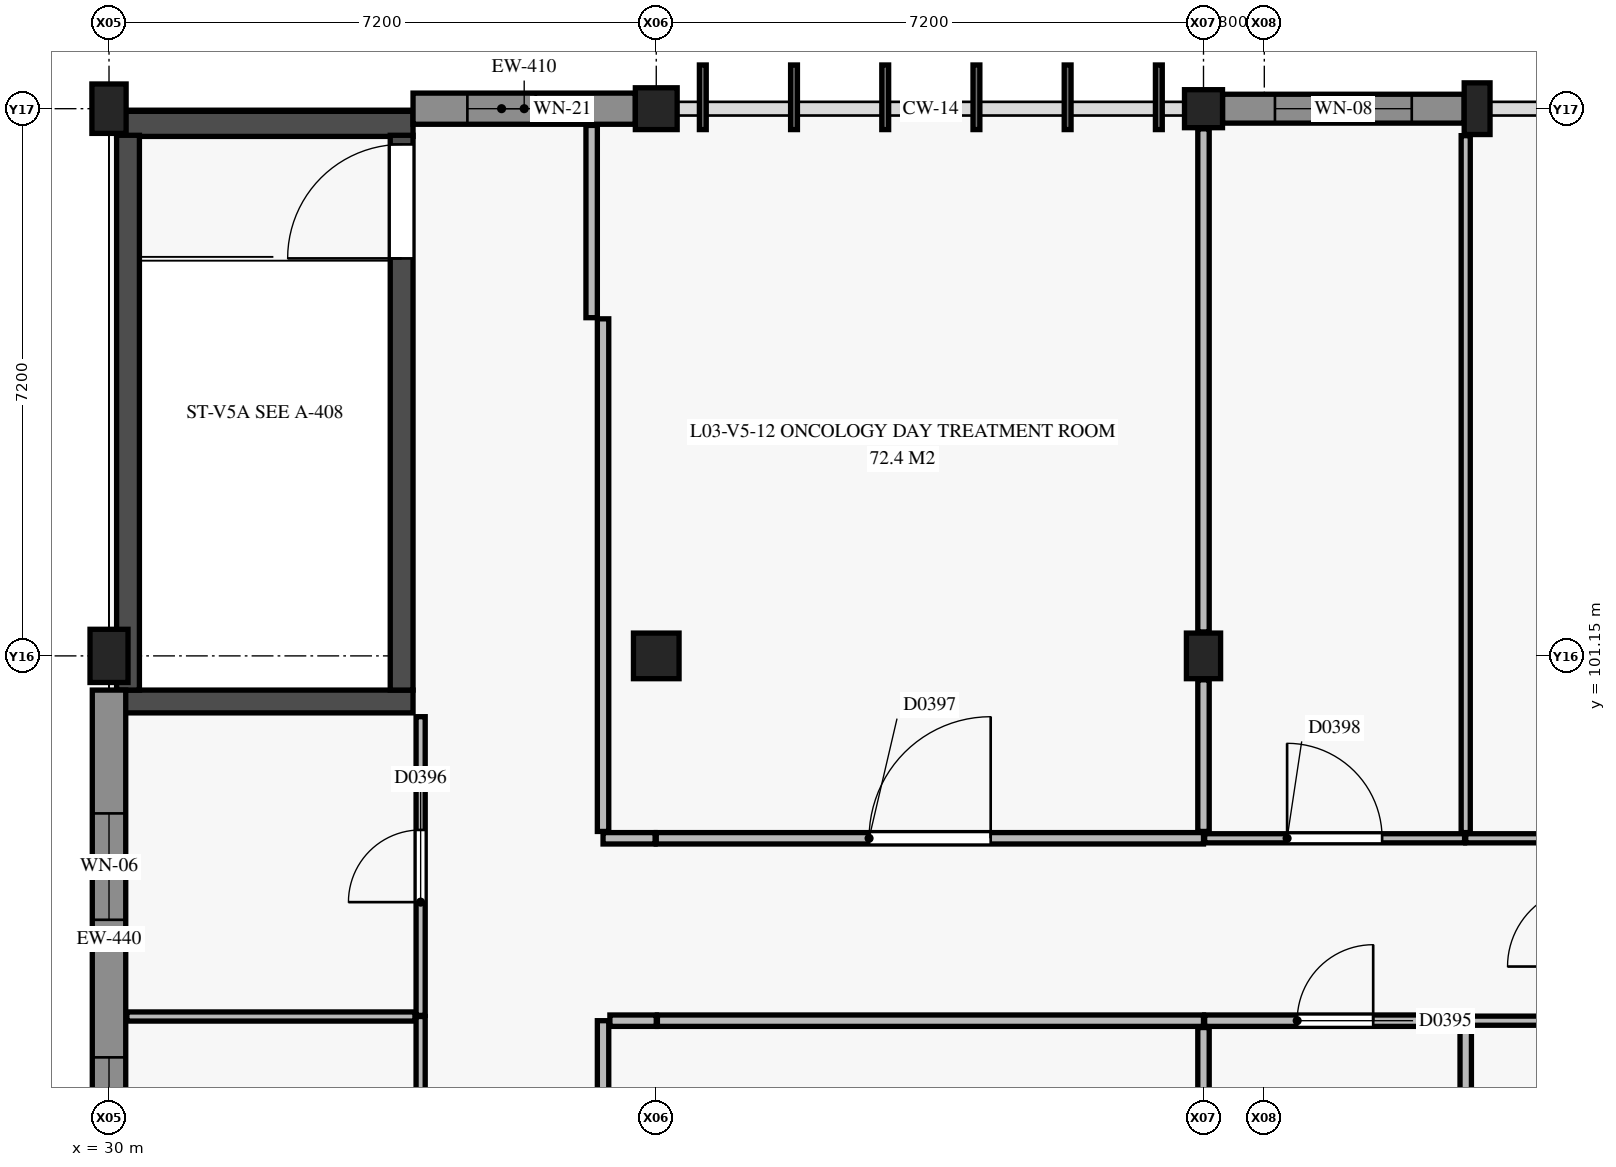
"""IFC4 building model, lengths in metres.
Left out: names, types, materials, properties, quantities, classifications, styles, units other than length and angle.
Written with IfcOpenShell. Run it as: python <this file> out.ifc"""

import sys

from ifc_helpers import new_model, si_unit, direction, frame, frame_2d, origin, origin_2d, place, context, subcontext, project, spatial, rectangle, circle, extrude, element, fill, save


model = new_model("IFC4")
c1 = context("Model", 3, precision=1e-05, world=origin(), true_north=direction((0.0, 1.0)))
c2 = subcontext(c1, "Body", "Model", "MODEL_VIEW")
j1 = project(units=[si_unit("LENGTHUNIT", "METRE"), si_unit("PLANEANGLEUNIT", "RADIAN")], contexts=[c1])
p1 = place(None, origin())
s1 = spatial("IfcSite", under=j1, at=p1, CompositionType="ELEMENT")
p2 = place(p1, origin())
s2 = spatial("IfcBuilding", under=s1, at=p2, CompositionType="ELEMENT")
p3 = place(p2, frame((0.0, 0.0, 13.2)))
s3 = spatial("IfcBuildingStorey", under=s2, at=p3, CompositionType="ELEMENT", Elevation=13.2)
p4 = place(p3, frame((30.0, 101.15, 0.0), z_axis=(0.0, 0.0, 1.0), x_axis=(1.0, 0.0, 0.0)))
e1 = element("IfcColumn", 1, at=p4, inside=s3, PredefinedType="COLUMN", context=c2, shape_type="SweptSolid", body=[
    extrude(rectangle(XDim=0.5, YDim=0.7, at=origin_2d()), origin(), (0.0, 0.0, 1.0), 4.05),
])
p5 = place(p3, frame((30.0, 108.35, 0.0), z_axis=(0.0, 0.0, 1.0), x_axis=(1.0, 0.0, 0.0)))
e2 = element("IfcColumn", 2, at=p5, inside=s3, PredefinedType="COLUMN", context=c2, shape_type="SweptSolid", body=[
    extrude(rectangle(XDim=0.45, YDim=0.65, at=origin_2d()), origin(), (0.0, 0.0, 1.0), 4.36),
])
p6 = place(p3, frame((37.2, 101.15, 0.0), z_axis=(0.0, 0.0, 1.0), x_axis=(1.0, 0.0, 0.0)))
e3 = element("IfcColumn", 3, at=p6, inside=s3, PredefinedType="COLUMN", context=c2, shape_type="SweptSolid", body=[
    extrude(rectangle(XDim=0.6, YDim=0.6, at=origin_2d()), origin(), (0.0, 0.0, 1.0), 4.05),
])
p7 = place(p3, frame((37.2, 108.35, 0.0), z_axis=(0.0, 0.0, 1.0), x_axis=(1.0, 0.0, 0.0)))
e4 = element("IfcColumn", 4, at=p7, inside=s3, PredefinedType="COLUMN", context=c2, shape_type="SweptSolid", body=[
    extrude(rectangle(XDim=0.55, YDim=0.55, at=origin_2d()), origin(), (0.0, 0.0, 1.0), 4.36),
])
p8 = place(p3, frame((44.4, 101.15, 0.0), z_axis=(0.0, 0.0, 1.0), x_axis=(1.0, 0.0, 0.0)))
e5 = element("IfcColumn", 5, at=p8, inside=s3, PredefinedType="COLUMN", context=c2, shape_type="SweptSolid", body=[
    extrude(rectangle(XDim=0.45, YDim=0.6, at=origin_2d()), origin(), (0.0, 0.0, 1.0), 4.05),
])
p9 = place(p3, frame((44.4, 108.35, 0.0), z_axis=(0.0, 0.0, 1.0), x_axis=(1.0, 0.0, 0.0)))
e6 = element("IfcColumn", 6, at=p9, inside=s3, PredefinedType="COLUMN", context=c2, shape_type="SweptSolid", body=[
    extrude(circle(Radius=0.25, at=origin_2d()), origin(), (0.0, 0.0, 1.0), 4.36),
])
p10 = place(p3, frame((48.0, 108.35, 0.0), z_axis=(0.0, 0.0, 1.0), x_axis=(1.0, 0.0, 0.0)))
e7 = element("IfcColumn", 7, at=p10, inside=s3, PredefinedType="PILASTER", context=c2, shape_type="SweptSolid", body=[
    extrude(rectangle(XDim=0.34, YDim=0.68, at=origin_2d()), origin(), (0.0, 0.0, 1.0), 4.2),
])
p11 = place(p3, frame((30.1, 100.55, 0.0), z_axis=(0.0, 0.0, 1.0), x_axis=(1.0, 0.0, 0.0)))
e8 = element("IfcWall", 8, at=p11, inside=s3, PredefinedType="SHEAR", context=c2, shape_type="SweptSolid", body=[
    extrude(rectangle(XDim=3.9, YDim=0.3, at=frame_2d((1.95, 0.0))), origin(), (0.0, 0.0, 1.0), 4.2),
])
p12 = place(p3, frame((30.1, 108.15, 0.0), z_axis=(0.0, 0.0, 1.0), x_axis=(1.0, 0.0, 0.0)))
e9 = element("IfcWall", 9, at=p12, inside=s3, PredefinedType="SHEAR", context=c2, shape_type="SweptSolid", body=[
    extrude(rectangle(XDim=3.9, YDim=0.33, at=frame_2d((1.95, 0.0))), origin(), (0.0, 0.0, 1.0), 4.2),
])
p13 = place(p3, frame((30.25, 100.7, 0.0), z_axis=(0.0, 0.0, 1.0), x_axis=(0.0, 1.0, 0.0)))
e10 = element("IfcWall", 10, at=p13, inside=s3, PredefinedType="SHEAR", context=c2, shape_type="SweptSolid", body=[
    extrude(rectangle(XDim=7.3, YDim=0.3, at=frame_2d((3.65, 0.0))), origin(), (0.0, 0.0, 1.0), 4.2),
])
p14 = place(p3, frame((33.85, 100.7, 0.0), z_axis=(0.0, 0.0, 1.0), x_axis=(0.0, 1.0, 0.0)))
e11 = element("IfcWall", 11, at=p14, inside=s3, PredefinedType="SHEAR", context=c2, shape_type="SweptSolid", body=[
    extrude(rectangle(XDim=7.3, YDim=0.3, at=frame_2d((3.65, 0.0))), origin(), (0.0, 0.0, 1.0), 4.2),
])
p15 = place(p14, frame((5.68, 0.0, 0.0)))
e12 = element("IfcOpeningElement", 12, at=p15, cuts=e11, PredefinedType="OPENING", context=c2, shape_type="SweptSolid", body=[
    extrude(rectangle(XDim=1.5, YDim=2.15, at=frame_2d((0.75, 1.075))), frame((0.0, 0.16, 0.0), z_axis=(0.0, -1.0, 0.0), x_axis=(1.0, 0.0, 0.0)), (0.0, 0.0, 1.0), 0.32),
])
p16 = place(p3, frame((30.0, 94.15, 0.0), z_axis=(0.0, 0.0, 1.0), x_axis=(0.0, 1.0, 0.0)))
e13 = element("IfcWall", 13, at=p16, inside=s3, PredefinedType="USERDEFINED", context=c2, shape_type="SweptSolid", body=[
    extrude(rectangle(XDim=6.55, YDim=0.44, at=frame_2d((3.275, 0.0))), origin(), (0.0, 0.0, 1.0), 3.38),
])
p17 = place(p16, frame((0.518, 0.0, 0.9)))
e14 = element("IfcOpeningElement", 14, at=p17, cuts=e13, PredefinedType="OPENING", context=c2, shape_type="SweptSolid", body=[
    extrude(rectangle(XDim=1.2, YDim=1.8, at=frame_2d((0.6, 0.9))), frame((0.0, 0.23, 0.0), z_axis=(0.0, -1.0, 0.0), x_axis=(1.0, 0.0, 0.0)), (0.0, 0.0, 1.0), 0.46),
])
p18 = place(p16, frame((3.528, 0.0, 0.9)))
e15 = element("IfcOpeningElement", 15, at=p18, cuts=e13, PredefinedType="OPENING", context=c2, shape_type="SweptSolid", body=[
    extrude(rectangle(XDim=1.4, YDim=1.8, at=frame_2d((0.7, 0.9))), frame((0.0, 0.23, 0.0), z_axis=(0.0, -1.0, 0.0), x_axis=(1.0, 0.0, 0.0)), (0.0, 0.0, 1.0), 0.46),
])
p19 = place(p3, frame((34.0, 108.35, 0.0), z_axis=(0.0, 0.0, 1.0), x_axis=(1.0, 0.0, 0.0)))
e16 = element("IfcWall", 16, at=p19, inside=s3, PredefinedType="USERDEFINED", context=c2, shape_type="SweptSolid", body=[
    extrude(rectangle(XDim=2.925, YDim=0.41, at=frame_2d((1.462, 0.0))), origin(), (0.0, 0.0, 1.0), 3.38),
])
p20 = place(p19, frame((0.715, 0.0, 0.95)))
e17 = element("IfcOpeningElement", 17, at=p20, cuts=e16, PredefinedType="OPENING", context=c2, shape_type="SweptSolid", body=[
    extrude(rectangle(XDim=0.9, YDim=1.2, at=frame_2d((0.45, 0.6))), frame((0.0, 0.215, 0.0), z_axis=(0.0, -1.0, 0.0), x_axis=(1.0, 0.0, 0.0)), (0.0, 0.0, 1.0), 0.43),
])
p21 = place(p3, frame((44.65, 108.35, 0.0), z_axis=(0.0, 0.0, 1.0), x_axis=(1.0, 0.0, 0.0)))
e18 = element("IfcWall", 18, at=p21, inside=s3, PredefinedType="USERDEFINED", context=c2, shape_type="SweptSolid", body=[
    extrude(rectangle(XDim=3.18, YDim=0.38, at=frame_2d((1.59, 0.0))), origin(), (0.0, 0.0, 1.0), 3.38),
])
p22 = place(p21, frame((0.69, 0.0, 0.9)))
e19 = element("IfcOpeningElement", 19, at=p22, cuts=e18, PredefinedType="OPENING", context=c2, shape_type="SweptSolid", body=[
    extrude(rectangle(XDim=1.8, YDim=1.8, at=frame_2d((0.9, 0.9))), frame((0.0, 0.2, 0.0), z_axis=(0.0, -1.0, 0.0), x_axis=(1.0, 0.0, 0.0)), (0.0, 0.0, 1.0), 0.4),
])
p23 = place(p3, frame((36.5, 83.89, 0.0), z_axis=(0.0, 0.0, 1.0), x_axis=(0.0, 1.0, 0.0)))
e20 = element("IfcWall", 20, at=p23, inside=s3, PredefinedType="PARTITIONING", context=c2, shape_type="SweptSolid", body=[
    extrude(rectangle(XDim=12.46, YDim=0.15, at=frame_2d((6.23, 0.0))), origin(), (0.0, 0.0, 1.0), 3.22),
])
p24 = place(p23, frame((5.655, 0.0, 0.0)))
e21 = element("IfcOpeningElement", 21, at=p24, cuts=e20, PredefinedType="OPENING", context=c2, shape_type="SweptSolid", body=[
    extrude(rectangle(XDim=1.15, YDim=2.15, at=frame_2d((0.575, 1.075))), frame((0.0, 0.085, 0.0), z_axis=(0.0, -1.0, 0.0), x_axis=(1.0, 0.0, 0.0)), (0.0, 0.0, 1.0), 0.17),
])
p25 = place(p3, frame((36.59, 96.35, 0.0), z_axis=(0.0, 0.0, 1.0), x_axis=(1.0, 0.0, 0.0)))
e22 = element("IfcWall", 22, at=p25, inside=s3, PredefinedType="PARTITIONING", context=c2, shape_type="SweptSolid", body=[
    extrude(rectangle(XDim=0.61, YDim=0.15, at=frame_2d((0.305, 0.0))), origin(), (0.0, 0.0, 1.0), 3.95),
])
p26 = place(p3, frame((37.215, 96.35, 0.0), z_axis=(0.0, 0.0, 1.0), x_axis=(1.0, 0.0, 0.0)))
e23 = element("IfcWall", 23, at=p26, inside=s3, PredefinedType="PARTITIONING", context=c2, shape_type="SweptSolid", body=[
    extrude(rectangle(XDim=7.185, YDim=0.15, at=frame_2d((3.592, 0.0))), origin(), (0.0, 0.0, 1.0), 3.95),
])
p27 = place(p3, frame((44.415, 96.35, 0.0), z_axis=(0.0, 0.0, 1.0), x_axis=(1.0, 0.0, 0.0)))
e24 = element("IfcWall", 24, at=p27, inside=s3, PredefinedType="PARTITIONING", context=c2, shape_type="SweptSolid", body=[
    extrude(rectangle(XDim=3.435, YDim=0.15, at=frame_2d((1.718, 0.0))), origin(), (0.0, 0.0, 1.0), 3.95),
])
p28 = place(p27, frame((1.218, 0.0, 0.0)))
e25 = element("IfcOpeningElement", 25, at=p28, cuts=e24, PredefinedType="OPENING", context=c2, shape_type="SweptSolid", body=[
    extrude(rectangle(XDim=1.0, YDim=2.15, at=frame_2d((0.5, 1.075))), frame((0.0, 0.085, 0.0), z_axis=(0.0, -1.0, 0.0), x_axis=(1.0, 0.0, 0.0)), (0.0, 0.0, 1.0), 0.17),
])
p29 = place(p3, frame((36.35, 105.6, 0.0), z_axis=(0.0, 0.0, 1.0), x_axis=(0.0, 1.0, 0.0)))
e26 = element("IfcWall", 26, at=p29, inside=s3, PredefinedType="PARTITIONING", context=c2, shape_type="SweptSolid", body=[
    extrude(rectangle(XDim=2.53, YDim=0.15, at=frame_2d((1.265, 0.0))), origin(), (0.0, 0.0, 1.0), 3.95),
])
p30 = place(p3, frame((37.2, 98.75, 0.0), z_axis=(0.0, 0.0, 1.0), x_axis=(1.0, 0.0, 0.0)))
e27 = element("IfcWall", 27, at=p30, inside=s3, PredefinedType="PARTITIONING", context=c2, shape_type="SweptSolid", body=[
    extrude(rectangle(XDim=7.2, YDim=0.15, at=frame_2d((3.6, 0.0))), origin(), (0.0, 0.0, 1.0), 3.95),
])
p31 = place(p30, frame((2.8, 0.0, 0.0)))
e28 = element("IfcOpeningElement", 28, at=p31, cuts=e27, PredefinedType="OPENING", context=c2, shape_type="SweptSolid", body=[
    extrude(rectangle(XDim=1.6, YDim=2.25, at=frame_2d((0.8, 1.125))), frame((0.0, 0.085, 0.0), z_axis=(0.0, -1.0, 0.0), x_axis=(1.0, 0.0, 0.0)), (0.0, 0.0, 1.0), 0.17),
])
p32 = place(p3, frame((36.5, 98.75, 0.0), z_axis=(0.0, 0.0, 1.0), x_axis=(1.0, 0.0, 0.0)))
e29 = element("IfcWall", 29, at=p32, inside=s3, PredefinedType="PARTITIONING", context=c2, shape_type="SweptSolid", body=[
    extrude(rectangle(XDim=0.685, YDim=0.15, at=frame_2d((0.343, 0.0))), origin(), (0.0, 0.0, 1.0), 3.95),
])
p33 = place(p3, frame((36.5, 98.84, 0.0), z_axis=(0.0, 0.0, 1.0), x_axis=(0.0, 1.0, 0.0)))
e30 = element("IfcWall", 30, at=p33, inside=s3, PredefinedType="PARTITIONING", context=c2, shape_type="SweptSolid", body=[
    extrude(rectangle(XDim=6.745, YDim=0.15, at=frame_2d((3.373, 0.0))), origin(), (0.0, 0.0, 1.0), 3.95),
])
p34 = place(p3, frame((34.1, 83.8, 0.0), z_axis=(0.0, 0.0, 1.0), x_axis=(0.0, 1.0, 0.0)))
e31 = element("IfcWall", 31, at=p34, inside=s3, PredefinedType="PARTITIONING", context=c2, shape_type="SweptSolid", body=[
    extrude(rectangle(XDim=12.605, YDim=0.12, at=frame_2d((6.302, 0.0))), origin(), (0.0, 0.0, 1.0), 3.22),
])
p35 = place(p34, frame((5.677, 0.0, 0.0)))
e32 = element("IfcOpeningElement", 32, at=p35, cuts=e31, PredefinedType="OPENING", context=c2, shape_type="SweptSolid", body=[
    extrude(rectangle(XDim=1.25, YDim=2.15, at=frame_2d((0.625, 1.075))), frame((0.0, 0.07, 0.0), z_axis=(0.0, -1.0, 0.0), x_axis=(1.0, 0.0, 0.0)), (0.0, 0.0, 1.0), 0.14),
])
p36 = place(p3, frame((47.865, 96.35, 0.0), z_axis=(0.0, 0.0, 1.0), x_axis=(1.0, 0.0, 0.0)))
e33 = element("IfcWall", 33, at=p36, inside=s3, PredefinedType="PARTITIONING", context=c2, shape_type="SweptSolid", body=[
    extrude(rectangle(XDim=1.585, YDim=0.12, at=frame_2d((0.792, 0.0))), origin(), (0.0, 0.0, 1.0), 3.95),
])
p37 = place(p3, frame((47.85, 98.75, 0.0), z_axis=(0.0, 0.0, 1.0), x_axis=(1.0, 0.0, 0.0)))
e34 = element("IfcWall", 34, at=p37, inside=s3, PredefinedType="PARTITIONING", context=c2, shape_type="SweptSolid", body=[
    extrude(rectangle(XDim=1.525, YDim=0.12, at=frame_2d((0.762, 0.0))), origin(), (0.0, 0.0, 1.0), 3.95),
])
p38 = place(p3, frame((34.1, 96.42, 0.0), z_axis=(0.0, 0.0, 1.0), x_axis=(0.0, 1.0, 0.0)))
e35 = element("IfcWall", 35, at=p38, inside=s3, PredefinedType="PARTITIONING", context=c2, shape_type="SweptSolid", body=[
    extrude(rectangle(XDim=3.93, YDim=0.12, at=frame_2d((1.965, 0.0))), origin(), (0.0, 0.0, 1.0), 3.95),
])
p39 = place(p38, frame((1.49, 0.0, 0.0)))
e36 = element("IfcOpeningElement", 36, at=p39, cuts=e35, PredefinedType="OPENING", context=c2, shape_type="SweptSolid", body=[
    extrude(rectangle(XDim=0.95, YDim=2.1, at=frame_2d((0.475, 1.05))), frame((0.0, 0.07, 0.0), z_axis=(0.0, -1.0, 0.0), x_axis=(1.0, 0.0, 0.0)), (0.0, 0.0, 1.0), 0.14),
])
p40 = place(p3, frame((44.415, 98.75, 0.0), z_axis=(0.0, 0.0, 1.0), x_axis=(1.0, 0.0, 0.0)))
e37 = element("IfcWall", 37, at=p40, inside=s3, PredefinedType="PARTITIONING", context=c2, shape_type="SweptSolid", body=[
    extrude(rectangle(XDim=3.42, YDim=0.12, at=frame_2d((1.71, 0.0))), origin(), (0.0, 0.0, 1.0), 3.95),
])
p41 = place(p40, frame((1.085, 0.0, 0.0)))
e38 = element("IfcOpeningElement", 38, at=p41, cuts=e37, PredefinedType="OPENING", context=c2, shape_type="SweptSolid", body=[
    extrude(rectangle(XDim=1.25, YDim=2.15, at=frame_2d((0.625, 1.075))), frame((0.0, 0.07, 0.0), z_axis=(0.0, -1.0, 0.0), x_axis=(1.0, 0.0, 0.0)), (0.0, 0.0, 1.0), 0.14),
])
p42 = place(p3, frame((44.4, 94.29, 0.0), z_axis=(0.0, 0.0, 1.0), x_axis=(0.0, 1.0, 0.0)))
e39 = element("IfcWall", 39, at=p42, inside=s3, PredefinedType="PARTITIONING", context=c2, shape_type="SweptSolid", body=[
    extrude(rectangle(XDim=1.97, YDim=0.15, at=frame_2d((0.985, 0.0))), origin(), (0.0, 0.0, 1.0), 3.95),
])
p43 = place(p3, frame((47.85, 90.865, 0.0), z_axis=(0.0, 0.0, 1.0), x_axis=(0.0, 1.0, 0.0)))
e40 = element("IfcWall", 40, at=p43, inside=s3, PredefinedType="PARTITIONING", context=c2, shape_type="SweptSolid", body=[
    extrude(rectangle(XDim=5.395, YDim=0.15, at=frame_2d((2.698, 0.0))), origin(), (0.0, 0.0, 1.0), 3.44),
])
p44 = place(p3, frame((44.4, 98.84, 0.0), z_axis=(0.0, 0.0, 1.0), x_axis=(0.0, 1.0, 0.0)))
e41 = element("IfcWall", 41, at=p44, inside=s3, PredefinedType="PARTITIONING", context=c2, shape_type="SweptSolid", body=[
    extrude(rectangle(XDim=1.995, YDim=0.15, at=frame_2d((0.998, 0.0))), origin(), (0.0, 0.0, 1.0), 3.95),
])
p45 = place(p3, frame((44.4, 101.465, 0.0), z_axis=(0.0, 0.0, 1.0), x_axis=(0.0, 1.0, 0.0)))
e42 = element("IfcWall", 42, at=p45, inside=s3, PredefinedType="PARTITIONING", context=c2, shape_type="SweptSolid", body=[
    extrude(rectangle(XDim=6.62, YDim=0.15, at=frame_2d((3.31, 0.0))), origin(), (0.0, 0.0, 1.0), 3.95),
])
p46 = place(p3, frame((30.235, 96.405, 0.0), z_axis=(0.0, 0.0, 1.0), x_axis=(1.0, 0.0, 0.0)))
e43 = element("IfcWall", 43, at=p46, inside=s3, PredefinedType="PARTITIONING", context=c2, shape_type="SweptSolid", body=[
    extrude(rectangle(XDim=3.79, YDim=0.12, at=frame_2d((1.895, 0.0))), origin(), (0.0, 0.0, 1.0), 3.95),
])
p47 = place(p3, frame((47.85, 98.825, 0.0), z_axis=(0.0, 0.0, 1.0), x_axis=(0.0, 1.0, 0.0)))
e44 = element("IfcWall", 44, at=p47, inside=s3, PredefinedType="PARTITIONING", context=c2, shape_type="SweptSolid", body=[
    extrude(rectangle(XDim=9.17, YDim=0.12, at=frame_2d((4.585, 0.0))), origin(), (0.0, 0.0, 1.0), 3.44),
])
p48 = place(p17, origin())
e45 = element("IfcWindow", 45, at=p48, inside=s3, PartitioningType="SINGLE_PANEL", PredefinedType="WINDOW", context=c2, shape_type="SweptSolid", body=[
    extrude(rectangle(XDim=1.2, YDim=1.8, at=frame_2d((0.6, 0.9))), frame((0.0, 0.03, 0.0), z_axis=(0.0, -1.0, 0.0), x_axis=(1.0, 0.0, 0.0)), (0.0, 0.0, 1.0), 0.06),
])
fill(e14, e45)
p49 = place(p18, origin())
e46 = element("IfcWindow", 46, at=p49, inside=s3, PartitioningType="SINGLE_PANEL", PredefinedType="WINDOW", context=c2, shape_type="SweptSolid", body=[
    extrude(rectangle(XDim=1.4, YDim=1.8, at=frame_2d((0.7, 0.9))), frame((0.0, 0.03, 0.0), z_axis=(0.0, -1.0, 0.0), x_axis=(1.0, 0.0, 0.0)), (0.0, 0.0, 1.0), 0.06),
])
fill(e15, e46)
p50 = place(p20, origin())
e47 = element("IfcWindow", 47, at=p50, inside=s3, PartitioningType="SINGLE_PANEL", PredefinedType="WINDOW", context=c2, shape_type="SweptSolid", body=[
    extrude(rectangle(XDim=0.9, YDim=1.2, at=frame_2d((0.45, 0.6))), frame((0.0, 0.03, 0.0), z_axis=(0.0, -1.0, 0.0), x_axis=(1.0, 0.0, 0.0)), (0.0, 0.0, 1.0), 0.06),
])
fill(e17, e47)
p51 = place(p22, origin())
e48 = element("IfcWindow", 48, at=p51, inside=s3, PartitioningType="SINGLE_PANEL", PredefinedType="WINDOW", context=c2, shape_type="SweptSolid", body=[
    extrude(rectangle(XDim=1.8, YDim=1.8, at=frame_2d((0.9, 0.9))), frame((0.0, 0.03, 0.0), z_axis=(0.0, -1.0, 0.0), x_axis=(1.0, 0.0, 0.0)), (0.0, 0.0, 1.0), 0.06),
])
fill(e19, e48)
p52 = place(p15, origin())
e49 = element("IfcDoor", 49, at=p52, inside=s3, OperationType="SINGLE_SWING_LEFT", PredefinedType="DOOR", context=c2, shape_type="SweptSolid", body=[
    extrude(rectangle(XDim=1.5, YDim=2.15, at=frame_2d((0.75, 1.075))), frame((0.0, 0.025, 0.0), z_axis=(0.0, -1.0, 0.0), x_axis=(1.0, 0.0, 0.0)), (0.0, 0.0, 1.0), 0.05),
])
fill(e12, e49)
p53 = place(p28, origin())
e50 = element("IfcDoor", 50, at=p53, inside=s3, OperationType="SINGLE_SWING_RIGHT", PredefinedType="DOOR", context=c2, shape_type="SweptSolid", body=[
    extrude(rectangle(XDim=1.0, YDim=2.15, at=frame_2d((0.5, 1.075))), frame((0.0, 0.025, 0.0), z_axis=(0.0, -1.0, 0.0), x_axis=(1.0, 0.0, 0.0)), (0.0, 0.0, 1.0), 0.05),
])
fill(e25, e50)
p54 = place(p39, origin())
e51 = element("IfcDoor", 51, at=p54, inside=s3, OperationType="SINGLE_SWING_LEFT", PredefinedType="DOOR", context=c2, shape_type="SweptSolid", body=[
    extrude(rectangle(XDim=0.95, YDim=2.1, at=frame_2d((0.475, 1.05))), frame((0.0, 0.025, 0.0), z_axis=(0.0, -1.0, 0.0), x_axis=(1.0, 0.0, 0.0)), (0.0, 0.0, 1.0), 0.05),
])
fill(e36, e51)
p55 = place(p31, origin())
e52 = element("IfcDoor", 52, at=p55, inside=s3, OperationType="SINGLE_SWING_RIGHT", PredefinedType="DOOR", context=c2, shape_type="SweptSolid", body=[
    extrude(rectangle(XDim=1.6, YDim=2.25, at=frame_2d((0.8, 1.125))), frame((0.0, 0.025, 0.0), z_axis=(0.0, -1.0, 0.0), x_axis=(1.0, 0.0, 0.0)), (0.0, 0.0, 1.0), 0.05),
])
fill(e28, e52)
p56 = place(p41, origin())
e53 = element("IfcDoor", 53, at=p56, inside=s3, OperationType="SINGLE_SWING_LEFT", PredefinedType="DOOR", context=c2, shape_type="SweptSolid", body=[
    extrude(rectangle(XDim=1.25, YDim=2.15, at=frame_2d((0.625, 1.075))), frame((0.0, 0.025, 0.0), z_axis=(0.0, -1.0, 0.0), x_axis=(1.0, 0.0, 0.0)), (0.0, 0.0, 1.0), 0.05),
])
fill(e38, e53)
save(model, sys.argv[1])
